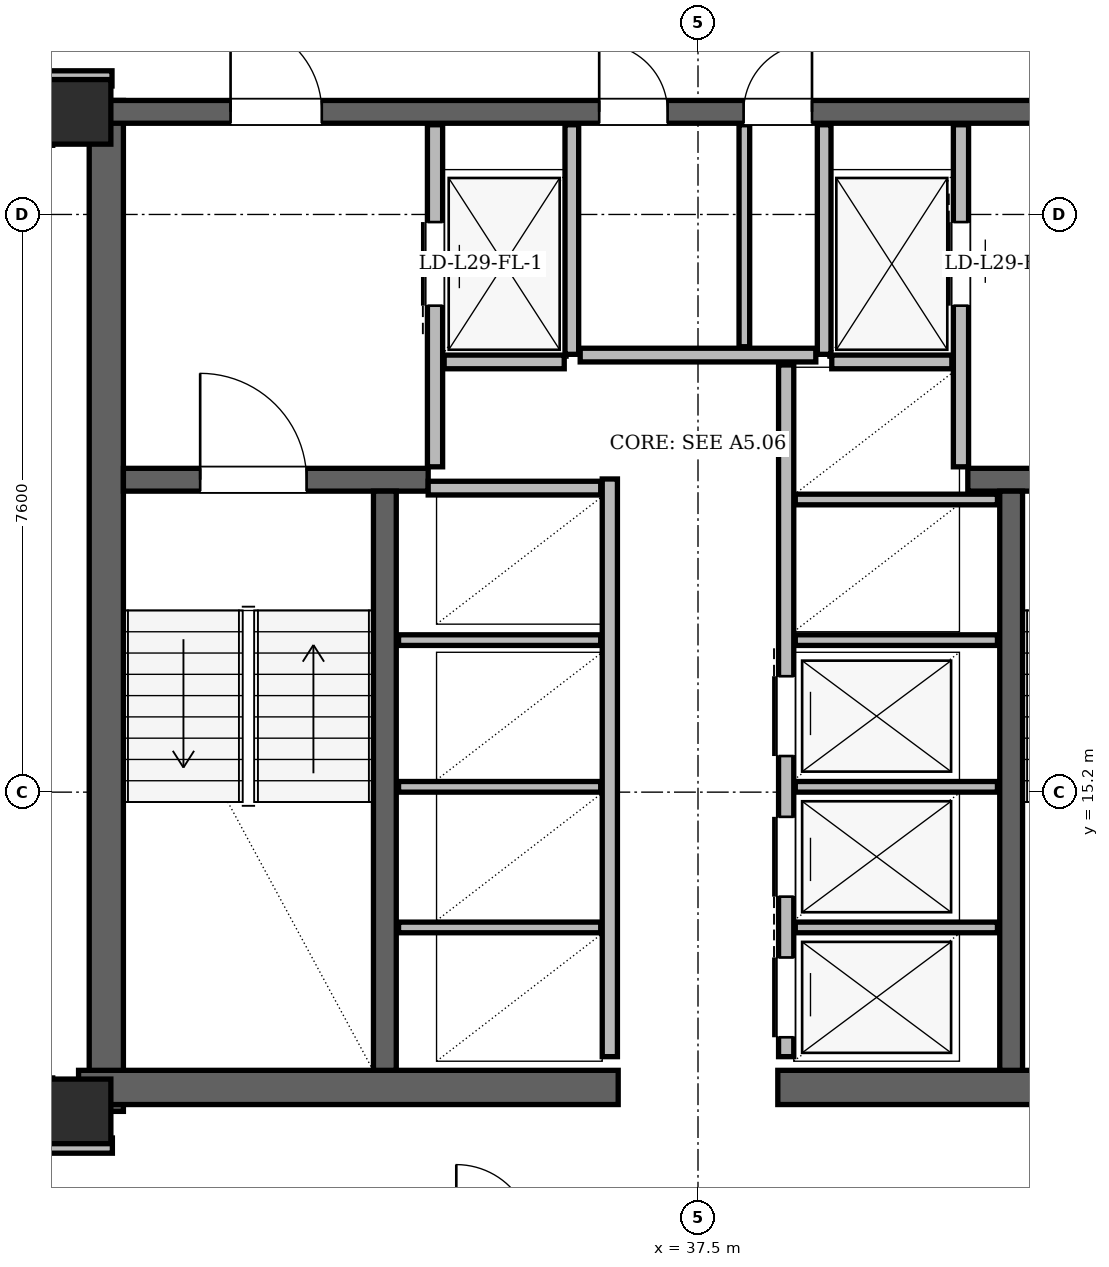
"""IFC4 building model, lengths in metres.
Left out: names, types, materials, properties, quantities, classifications, styles, units other than length and angle.
Written with IfcOpenShell. Run it as: python <this file> out.ifc"""

import sys

from ifc_helpers import new_model, si_unit, direction, frame, frame_2d, origin, origin_2d, place, context, subcontext, project, spatial, rectangle, hollow_rectangle, extrude, element, fill, save


model = new_model("IFC4")
c1 = context("Model", 3, precision=1e-05, world=origin(), true_north=direction((0.0, 1.0)))
c2 = subcontext(c1, "Body", "Model", "MODEL_VIEW")
j1 = project(units=[si_unit("LENGTHUNIT", "METRE"), si_unit("PLANEANGLEUNIT", "RADIAN")], contexts=[c1])
p1 = place(None, origin())
s1 = spatial("IfcSite", under=j1, at=p1, CompositionType="ELEMENT")
p2 = place(p1, origin())
s2 = spatial("IfcBuilding", under=s1, at=p2, CompositionType="ELEMENT")
p3 = place(p2, frame((0.0, 0.0, 112.2)))
s3 = spatial("IfcBuildingStorey", under=s2, at=p3, CompositionType="ELEMENT", Elevation=112.2)
for number, where, z_axis, x_axis in (
    (1, (29.35, 11.0, 0.0), (0.0, 0.0, 1.0), (1.0, 0.0, 0.0)),
    (2, (29.35, 24.15, 0.0), (0.0, 0.0, 1.0), (1.0, 0.0, 0.0)),
):
    element("IfcColumn", number, at=place(p3, frame(where, z_axis=z_axis, x_axis=x_axis)), inside=s3, PredefinedType="COLUMN", context=c2, shape_type="SweptSolid", body=[
        extrude(hollow_rectangle(XDim=0.85, YDim=0.85, WallThickness=0.07, at=origin_2d()), origin(), (0.0, 0.0, 1.0), 3.6),
    ])
p4 = place(p3, frame((29.715, 11.0, 0.0), z_axis=(0.0, 0.0, 1.0), x_axis=(0.0, 1.0, 0.0)))
e3 = element("IfcWall", 3, at=p4, inside=s3, PredefinedType="SHEAR", context=c2, shape_type="SweptSolid", body=[
    extrude(rectangle(XDim=13.3, YDim=0.45, at=frame_2d((6.65, 0.0))), origin(), (0.0, 0.0, 1.0), 3.36),
])
for number, where, z_axis, x_axis in (
    (4, (29.35, 11.315, 0.0), (0.0, 0.0, 1.0), (1.0, 0.0, 0.0)),
    (5, (38.55, 11.315, 0.0), (0.0, 0.0, 1.0), (1.0, 0.0, 0.0)),
):
    element("IfcWall", number, at=place(p3, frame(where, z_axis=z_axis, x_axis=x_axis)), inside=s3, PredefinedType="SHEAR", context=c2, shape_type="SweptSolid", body=[
        extrude(rectangle(XDim=7.1, YDim=0.45, at=frame_2d((3.55, 0.0))), origin(), (0.0, 0.0, 1.0), 3.36),
    ])
p5 = place(p3, frame((29.65, 24.15, 0.0), z_axis=(0.0, 0.0, 1.0), x_axis=(1.0, 0.0, 0.0)))
e6 = element("IfcWall", 6, at=p5, inside=s3, PredefinedType="SHEAR", context=c2, shape_type="SweptSolid", body=[
    extrude(rectangle(XDim=15.7, YDim=0.3, at=frame_2d((7.85, 0.0))), origin(), (0.0, 0.0, 1.0), 3.36),
])
p6 = place(p5, frame((1.7, 0.0, 0.0)))
e7 = element("IfcOpeningElement", 7, at=p6, cuts=e6, PredefinedType="OPENING", context=c2, shape_type="SweptSolid", body=[
    extrude(rectangle(XDim=1.2, YDim=2.2, at=frame_2d((0.6, 1.1))), frame((0.0, 0.15, 0.0), z_axis=(0.0, -1.0, 0.0), x_axis=(1.0, 0.0, 0.0)), (0.0, 0.0, 1.0), 0.3),
])
p7 = place(p5, frame((12.8, 0.0, 0.0)))
e8 = element("IfcOpeningElement", 8, at=p7, cuts=e6, PredefinedType="OPENING", context=c2, shape_type="SweptSolid", body=[
    extrude(rectangle(XDim=1.2, YDim=2.2, at=frame_2d((0.6, 1.1))), frame((0.0, 0.15, 0.0), z_axis=(0.0, -1.0, 0.0), x_axis=(1.0, 0.0, 0.0)), (0.0, 0.0, 1.0), 0.3),
])
p8 = place(p5, frame((6.55, 0.0, 0.0)))
e9 = element("IfcOpeningElement", 9, at=p8, cuts=e6, PredefinedType="OPENING", context=c2, shape_type="SweptSolid", body=[
    extrude(rectangle(XDim=0.9, YDim=2.05, at=frame_2d((0.45, 1.025))), frame((0.0, 0.15, 0.0), z_axis=(0.0, -1.0, 0.0), x_axis=(1.0, 0.0, 0.0)), (0.0, 0.0, 1.0), 0.3),
])
p9 = place(p5, frame((8.45, 0.0, 0.0)))
e10 = element("IfcOpeningElement", 10, at=p9, cuts=e6, PredefinedType="OPENING", context=c2, shape_type="SweptSolid", body=[
    extrude(rectangle(XDim=0.9, YDim=2.05, at=frame_2d((0.45, 1.025))), frame((0.0, 0.15, 0.0), z_axis=(0.0, -1.0, 0.0), x_axis=(1.0, 0.0, 0.0)), (0.0, 0.0, 1.0), 0.3),
])
p10 = place(p3, frame((29.94, 19.31, 0.0), z_axis=(0.0, 0.0, 1.0), x_axis=(1.0, 0.0, 0.0)))
e11 = element("IfcWall", 11, at=p10, inside=s3, PredefinedType="SHEAR", context=c2, shape_type="SweptSolid", body=[
    extrude(rectangle(XDim=4.01, YDim=0.3, at=frame_2d((2.005, 0.0))), origin(), (0.0, 0.0, 1.0), 3.36),
])
p11 = place(p10, frame((1.01, 0.0, 0.0)))
e12 = element("IfcOpeningElement", 12, at=p11, cuts=e11, PredefinedType="OPENING", context=c2, shape_type="SweptSolid", body=[
    extrude(rectangle(XDim=1.4, YDim=2.2, at=frame_2d((0.7, 1.1))), frame((0.0, 0.15, 0.0), z_axis=(0.0, -1.0, 0.0), x_axis=(1.0, 0.0, 0.0)), (0.0, 0.0, 1.0), 0.3),
])
p12 = place(p3, frame((41.05, 19.31, 0.0), z_axis=(0.0, 0.0, 1.0), x_axis=(1.0, 0.0, 0.0)))
e13 = element("IfcWall", 13, at=p12, inside=s3, PredefinedType="SHEAR", context=c2, shape_type="SweptSolid", body=[
    extrude(rectangle(XDim=4.01, YDim=0.3, at=frame_2d((2.005, 0.0))), origin(), (0.0, 0.0, 1.0), 3.36),
])
p13 = place(p12, frame((1.6, 0.0, 0.0)))
e14 = element("IfcOpeningElement", 14, at=p13, cuts=e13, PredefinedType="OPENING", context=c2, shape_type="SweptSolid", body=[
    extrude(rectangle(XDim=1.4, YDim=2.2, at=frame_2d((0.7, 1.1))), frame((0.0, 0.15, 0.0), z_axis=(0.0, -1.0, 0.0), x_axis=(1.0, 0.0, 0.0)), (0.0, 0.0, 1.0), 0.3),
])
for number, where, z_axis, x_axis in (
    (15, (33.38, 11.54, 0.0), (0.0, 0.0, 1.0), (0.0, 1.0, 0.0)),
    (16, (41.62, 11.54, 0.0), (0.0, 0.0, 1.0), (0.0, 1.0, 0.0)),
):
    element("IfcWall", number, at=place(p3, frame(where, z_axis=z_axis, x_axis=x_axis)), inside=s3, PredefinedType="SHEAR", context=c2, shape_type="SweptSolid", body=[
        extrude(rectangle(XDim=7.62, YDim=0.3, at=frame_2d((3.81, 0.0))), origin(), (0.0, 0.0, 1.0), 3.36),
    ])
p14 = place(p3, frame((31.85, 43.425, 0.0), z_axis=(0.0, 0.0, 1.0), x_axis=(-0.500004027594, -0.866023078439, 0.0)))
e17 = element("IfcWall", 17, at=p14, inside=s3, PredefinedType="SOLIDWALL", context=c2, shape_type="SweptSolid", body=[
    extrude(rectangle(XDim=34.75, YDim=0.34, at=frame_2d((17.375, 0.0))), origin(), (0.0, 0.0, 1.0), 2.578),
])
p15 = place(p14, frame((6.369, 0.0, 0.0)))
e18 = element("IfcOpeningElement", 18, at=p15, cuts=e17, PredefinedType="OPENING", context=c2, shape_type="SweptSolid", body=[
    extrude(rectangle(XDim=1.5, YDim=2.2, at=frame_2d((0.75, 1.1))), frame((0.0, 0.17, 0.0), z_axis=(0.0, -1.0, 0.0), x_axis=(1.0, 0.0, 0.0)), (0.0, 0.0, 1.0), 0.34),
])
p16 = place(p14, frame((25.216, 0.0, 0.0)))
e19 = element("IfcOpeningElement", 19, at=p16, cuts=e17, PredefinedType="OPENING", context=c2, shape_type="SweptSolid", body=[
    extrude(rectangle(XDim=1.5, YDim=2.2, at=frame_2d((0.75, 1.1))), frame((0.0, 0.17, 0.0), z_axis=(0.0, -1.0, 0.0), x_axis=(1.0, 0.0, 0.0)), (0.0, 0.0, 1.0), 0.34),
])
p17 = place(p14, frame((32.486, 0.0, 0.85)))
e20 = element("IfcOpeningElement", 20, at=p17, cuts=e17, PredefinedType="OPENING", context=c2, shape_type="SweptSolid", body=[
    extrude(rectangle(XDim=1.2, YDim=1.48, at=frame_2d((0.6, 0.74))), frame((0.0, 0.17, 0.0), z_axis=(0.0, -1.0, 0.0), x_axis=(1.0, 0.0, 0.0)), (0.0, 0.0, 1.0), 0.34),
])
p18 = place(p14, frame((27.16, 0.0, 0.85)))
e21 = element("IfcOpeningElement", 21, at=p18, cuts=e17, PredefinedType="OPENING", context=c2, shape_type="SweptSolid", body=[
    extrude(rectangle(XDim=1.2, YDim=1.48, at=frame_2d((0.6, 0.74))), frame((0.0, 0.17, 0.0), z_axis=(0.0, -1.0, 0.0), x_axis=(1.0, 0.0, 0.0)), (0.0, 0.0, 1.0), 0.34),
])
p19 = place(p14, frame((3.218, 0.0, 0.85)))
e22 = element("IfcOpeningElement", 22, at=p19, cuts=e17, PredefinedType="OPENING", context=c2, shape_type="SweptSolid", body=[
    extrude(rectangle(XDim=1.2, YDim=1.48, at=frame_2d((0.6, 0.74))), frame((0.0, 0.17, 0.0), z_axis=(0.0, -1.0, 0.0), x_axis=(1.0, 0.0, 0.0)), (0.0, 0.0, 1.0), 0.34),
])
p20 = place(p14, frame((14.421, 0.0, 0.85)))
e23 = element("IfcOpeningElement", 23, at=p20, cuts=e17, PredefinedType="OPENING", context=c2, shape_type="SweptSolid", body=[
    extrude(rectangle(XDim=1.2, YDim=1.48, at=frame_2d((0.6, 0.74))), frame((0.0, 0.17, 0.0), z_axis=(0.0, -1.0, 0.0), x_axis=(1.0, 0.0, 0.0)), (0.0, 0.0, 1.0), 0.34),
])
p21 = place(p3, frame((34.04, 19.48, 0.0), z_axis=(0.0, 0.0, 1.0), x_axis=(0.0, 1.0, 0.0)))
e24 = element("IfcWall", 24, at=p21, inside=s3, PredefinedType="PARTITIONING", context=c2, shape_type="SweptSolid", body=[
    extrude(rectangle(XDim=4.5, YDim=0.2, at=frame_2d((2.25, 0.0))), origin(), (0.0, 0.0, 1.0), 2.4),
])
p22 = place(p21, frame((2.12, 0.0, 0.0)))
e25 = element("IfcOpeningElement", 25, at=p22, cuts=e24, PredefinedType="OPENING", context=c2, shape_type="SweptSolid", body=[
    extrude(rectangle(XDim=1.1, YDim=2.2, at=frame_2d((0.55, 1.1))), frame((0.0, 0.1, 0.0), z_axis=(0.0, -1.0, 0.0), x_axis=(1.0, 0.0, 0.0)), (0.0, 0.0, 1.0), 0.2),
])
p23 = place(p3, frame((35.84, 20.96, 0.0), z_axis=(0.0, 0.0, 1.0), x_axis=(0.0, 1.0, 0.0)))
e26 = element("IfcWall", 26, at=p23, inside=s3, PredefinedType="PARTITIONING", context=c2, shape_type="SweptSolid", body=[
    extrude(rectangle(XDim=3.02, YDim=0.18, at=frame_2d((1.51, 0.0))), origin(), (0.0, 0.0, 1.0), 2.4),
])
p24 = place(p3, frame((34.16, 20.86, 0.0), z_axis=(0.0, 0.0, 1.0), x_axis=(1.0, 0.0, 0.0)))
e27 = element("IfcWall", 27, at=p24, inside=s3, PredefinedType="PARTITIONING", context=c2, shape_type="SweptSolid", body=[
    extrude(rectangle(XDim=1.58, YDim=0.18, at=frame_2d((0.79, 0.0))), origin(), (0.0, 0.0, 1.0), 3.36),
])
p25 = place(p3, frame((40.96, 19.48, 0.0), z_axis=(0.0, 0.0, 1.0), x_axis=(0.0, 1.0, 0.0)))
e28 = element("IfcWall", 28, at=p25, inside=s3, PredefinedType="PARTITIONING", context=c2, shape_type="SweptSolid", body=[
    extrude(rectangle(XDim=4.5, YDim=0.2, at=frame_2d((2.25, 0.0))), origin(), (0.0, 0.0, 1.0), 2.4),
])
p26 = place(p25, frame((2.12, 0.0, 0.0)))
e29 = element("IfcOpeningElement", 29, at=p26, cuts=e28, PredefinedType="OPENING", context=c2, shape_type="SweptSolid", body=[
    extrude(rectangle(XDim=1.1, YDim=2.2, at=frame_2d((0.55, 1.1))), frame((0.0, 0.1, 0.0), z_axis=(0.0, -1.0, 0.0), x_axis=(1.0, 0.0, 0.0)), (0.0, 0.0, 1.0), 0.2),
])
p27 = place(p3, frame((39.16, 20.96, 0.0), z_axis=(0.0, 0.0, 1.0), x_axis=(0.0, 1.0, 0.0)))
e30 = element("IfcWall", 30, at=p27, inside=s3, PredefinedType="PARTITIONING", context=c2, shape_type="SweptSolid", body=[
    extrude(rectangle(XDim=3.02, YDim=0.18, at=frame_2d((1.51, 0.0))), origin(), (0.0, 0.0, 1.0), 2.4),
])
p28 = place(p3, frame((39.26, 20.86, 0.0), z_axis=(0.0, 0.0, 1.0), x_axis=(1.0, 0.0, 0.0)))
e31 = element("IfcWall", 31, at=p28, inside=s3, PredefinedType="PARTITIONING", context=c2, shape_type="SweptSolid", body=[
    extrude(rectangle(XDim=1.58, YDim=0.18, at=frame_2d((0.79, 0.0))), origin(), (0.0, 0.0, 1.0), 3.36),
])
p29 = place(p3, frame((36.34, 11.72, 0.0), z_axis=(0.0, 0.0, 1.0), x_axis=(0.0, 1.0, 0.0)))
e32 = element("IfcWall", 32, at=p29, inside=s3, PredefinedType="PARTITIONING", context=c2, shape_type="SweptSolid", body=[
    extrude(rectangle(XDim=7.6, YDim=0.2, at=frame_2d((3.8, 0.0))), origin(), (0.0, 0.0, 1.0), 3.36),
])
p30 = place(p3, frame((33.95, 19.2, 0.0), z_axis=(0.0, 0.0, 1.0), x_axis=(1.0, 0.0, 0.0)))
e33 = element("IfcWall", 33, at=p30, inside=s3, PredefinedType="PARTITIONING", context=c2, shape_type="SweptSolid", body=[
    extrude(rectangle(XDim=2.27, YDim=0.18, at=frame_2d((1.135, 0.0))), origin(), (0.0, 0.0, 1.0), 3.36),
])
for number, where, z_axis, x_axis in (
    (34, (33.56, 13.42, 0.0), (0.0, 0.0, 1.0), (1.0, 0.0, 0.0)),
    (35, (33.56, 15.27, 0.0), (0.0, 0.0, 1.0), (1.0, 0.0, 0.0)),
    (36, (33.56, 17.2, 0.0), (0.0, 0.0, 1.0), (1.0, 0.0, 0.0)),
):
    element("IfcWall", number, at=place(p3, frame(where, z_axis=z_axis, x_axis=x_axis)), inside=s3, PredefinedType="PARTITIONING", context=c2, shape_type="SweptSolid", body=[
        extrude(rectangle(XDim=2.66, YDim=0.14, at=frame_2d((1.33, 0.0))), origin(), (0.0, 0.0, 1.0), 3.36),
    ])
p31 = place(p3, frame((38.66, 11.72, 0.0), z_axis=(0.0, 0.0, 1.0), x_axis=(0.0, 1.0, 0.0)))
e37 = element("IfcWall", 37, at=p31, inside=s3, PredefinedType="PARTITIONING", context=c2, shape_type="SweptSolid", body=[
    extrude(rectangle(XDim=9.1, YDim=0.2, at=frame_2d((4.55, 0.0))), origin(), (0.0, 0.0, 1.0), 3.36),
])
p32 = place(p31, frame((0.255, 0.0, 0.0)))
e38 = element("IfcOpeningElement", 38, at=p32, cuts=e37, PredefinedType="OPENING", context=c2, shape_type="SweptSolid", body=[
    extrude(rectangle(XDim=1.05, YDim=2.15, at=frame_2d((0.525, 1.075))), frame((0.0, 0.1, 0.0), z_axis=(0.0, -1.0, 0.0), x_axis=(1.0, 0.0, 0.0)), (0.0, 0.0, 1.0), 0.2),
])
p33 = place(p31, frame((2.105, 0.0, 0.0)))
e39 = element("IfcOpeningElement", 39, at=p33, cuts=e37, PredefinedType="OPENING", context=c2, shape_type="SweptSolid", body=[
    extrude(rectangle(XDim=1.05, YDim=2.15, at=frame_2d((0.525, 1.075))), frame((0.0, 0.1, 0.0), z_axis=(0.0, -1.0, 0.0), x_axis=(1.0, 0.0, 0.0)), (0.0, 0.0, 1.0), 0.2),
])
p34 = place(p31, frame((3.955, 0.0, 0.0)))
e40 = element("IfcOpeningElement", 40, at=p34, cuts=e37, PredefinedType="OPENING", context=c2, shape_type="SweptSolid", body=[
    extrude(rectangle(XDim=1.05, YDim=2.15, at=frame_2d((0.525, 1.075))), frame((0.0, 0.1, 0.0), z_axis=(0.0, -1.0, 0.0), x_axis=(1.0, 0.0, 0.0)), (0.0, 0.0, 1.0), 0.2),
])
for number, where, z_axis, x_axis in (
    (41, (38.78, 13.42, 0.0), (0.0, 0.0, 1.0), (1.0, 0.0, 0.0)),
    (42, (38.78, 15.27, 0.0), (0.0, 0.0, 1.0), (1.0, 0.0, 0.0)),
    (43, (38.78, 17.2, 0.0), (0.0, 0.0, 1.0), (1.0, 0.0, 0.0)),
    (44, (38.78, 19.05, 0.0), (0.0, 0.0, 1.0), (1.0, 0.0, 0.0)),
):
    element("IfcWall", number, at=place(p3, frame(where, z_axis=z_axis, x_axis=x_axis)), inside=s3, PredefinedType="PARTITIONING", context=c2, shape_type="SweptSolid", body=[
        extrude(rectangle(XDim=2.66, YDim=0.14, at=frame_2d((1.33, 0.0))), origin(), (0.0, 0.0, 1.0), 3.36),
    ])
p35 = place(p3, frame((35.95, 20.95, 0.0), z_axis=(0.0, 0.0, 1.0), x_axis=(1.0, 0.0, 0.0)))
e45 = element("IfcWall", 45, at=p35, inside=s3, PredefinedType="PARTITIONING", context=c2, shape_type="SweptSolid", body=[
    extrude(rectangle(XDim=3.1, YDim=0.18, at=frame_2d((1.55, 0.0))), origin(), (0.0, 0.0, 1.0), 3.36),
])
p36 = place(p3, frame((38.11, 21.06, 0.0), z_axis=(0.0, 0.0, 1.0), x_axis=(0.0, 1.0, 0.0)))
e46 = element("IfcWall", 46, at=p36, inside=s3, PredefinedType="PARTITIONING", context=c2, shape_type="SweptSolid", body=[
    extrude(rectangle(XDim=2.92, YDim=0.14, at=frame_2d((1.46, 0.0))), origin(), (0.0, 0.0, 1.0), 2.4),
])
p37 = place(p3, frame((28.905, 10.55, 0.0), z_axis=(0.0, 0.0, 1.0), x_axis=(1.0, 0.0, 0.0)))
e47 = element("IfcWall", 47, at=p37, inside=s3, PredefinedType="PARTITIONING", context=c2, shape_type="SweptSolid", body=[
    extrude(rectangle(XDim=0.89, YDim=0.2, at=frame_2d((0.445, 0.0))), origin(), (0.0, 0.0, 1.0), 3.36),
])
p38 = place(p3, frame((28.91, 24.59, 0.0), z_axis=(0.0, 0.0, 1.0), x_axis=(1.0, 0.0, 0.0)))
e48 = element("IfcWall", 48, at=p38, inside=s3, PredefinedType="PARTITIONING", context=c2, shape_type="SweptSolid", body=[
    extrude(rectangle(XDim=0.88, YDim=0.2, at=frame_2d((0.44, 0.0))), origin(), (0.0, 0.0, 1.0), 2.814),
])
p39 = place(p3, frame((28.91, 10.654, 0.0), z_axis=(0.0, 0.0, 1.0), x_axis=(0.0, 1.0, 0.0)))
e49 = element("IfcWall", 49, at=p39, inside=s3, PredefinedType="PARTITIONING", context=c2, shape_type="SweptSolid", body=[
    extrude(rectangle(XDim=0.786, YDim=0.2, at=frame_2d((0.393, 0.0))), origin(), (0.0, 0.0, 1.0), 2.814),
])
p40 = place(p3, frame((28.91, 23.71, 0.0), z_axis=(0.0, 0.0, 1.0), x_axis=(0.0, 1.0, 0.0)))
e50 = element("IfcWall", 50, at=p40, inside=s3, PredefinedType="PARTITIONING", context=c2, shape_type="SweptSolid", body=[
    extrude(rectangle(XDim=0.61, YDim=0.2, at=frame_2d((0.305, 0.0))), origin(), (0.0, 0.0, 1.0), 3.36),
])
p41 = place(p22, origin())
e51 = element("IfcDoor", 51, at=p41, inside=s3, OperationType="SLIDING_TO_LEFT", PredefinedType="DOOR", context=c2, shape_type="SweptSolid", body=[
    extrude(rectangle(XDim=1.1, YDim=2.2, at=frame_2d((0.55, 1.1))), frame((0.0, 0.025, 0.0), z_axis=(0.0, -1.0, 0.0), x_axis=(1.0, 0.0, 0.0)), (0.0, 0.0, 1.0), 0.05),
])
fill(e25, e51)
p42 = place(p26, origin())
e52 = element("IfcDoor", 52, at=p42, inside=s3, OperationType="SLIDING_TO_RIGHT", PredefinedType="DOOR", context=c2, shape_type="SweptSolid", body=[
    extrude(rectangle(XDim=1.1, YDim=2.2, at=frame_2d((0.55, 1.1))), frame((0.0, 0.025, 0.0), z_axis=(0.0, -1.0, 0.0), x_axis=(1.0, 0.0, 0.0)), (0.0, 0.0, 1.0), 0.05),
])
fill(e29, e52)
p43 = place(p32, origin())
e53 = element("IfcDoor", 53, at=p43, inside=s3, OperationType="SLIDING_TO_RIGHT", PredefinedType="DOOR", context=c2, shape_type="SweptSolid", body=[
    extrude(rectangle(XDim=1.05, YDim=2.15, at=frame_2d((0.525, 1.075))), frame((0.0, 0.025, 0.0), z_axis=(0.0, -1.0, 0.0), x_axis=(1.0, 0.0, 0.0)), (0.0, 0.0, 1.0), 0.05),
])
fill(e38, e53)
p44 = place(p33, origin())
e54 = element("IfcDoor", 54, at=p44, inside=s3, OperationType="SLIDING_TO_LEFT", PredefinedType="DOOR", context=c2, shape_type="SweptSolid", body=[
    extrude(rectangle(XDim=1.05, YDim=2.15, at=frame_2d((0.525, 1.075))), frame((0.0, 0.025, 0.0), z_axis=(0.0, -1.0, 0.0), x_axis=(1.0, 0.0, 0.0)), (0.0, 0.0, 1.0), 0.05),
])
fill(e39, e54)
p45 = place(p34, origin())
e55 = element("IfcDoor", 55, at=p45, inside=s3, OperationType="SLIDING_TO_RIGHT", PredefinedType="DOOR", context=c2, shape_type="SweptSolid", body=[
    extrude(rectangle(XDim=1.05, YDim=2.15, at=frame_2d((0.525, 1.075))), frame((0.0, 0.025, 0.0), z_axis=(0.0, -1.0, 0.0), x_axis=(1.0, 0.0, 0.0)), (0.0, 0.0, 1.0), 0.05),
])
fill(e40, e55)
p46 = place(p11, origin())
e56 = element("IfcDoor", 56, at=p46, inside=s3, OperationType="SINGLE_SWING_LEFT", PredefinedType="DOOR", context=c2, shape_type="SweptSolid", body=[
    extrude(rectangle(XDim=1.4, YDim=2.2, at=frame_2d((0.7, 1.1))), frame((0.0, 0.025, 0.0), z_axis=(0.0, -1.0, 0.0), x_axis=(1.0, 0.0, 0.0)), (0.0, 0.0, 1.0), 0.05),
])
fill(e12, e56)
p47 = place(p6, origin())
e57 = element("IfcDoor", 57, at=p47, inside=s3, OperationType="SINGLE_SWING_LEFT", PredefinedType="DOOR", context=c2, shape_type="SweptSolid", body=[
    extrude(rectangle(XDim=1.2, YDim=2.2, at=frame_2d((0.6, 1.1))), frame((0.0, 0.025, 0.0), z_axis=(0.0, -1.0, 0.0), x_axis=(1.0, 0.0, 0.0)), (0.0, 0.0, 1.0), 0.05),
])
fill(e7, e57)
p48 = place(p8, origin())
e58 = element("IfcDoor", 58, at=p48, inside=s3, OperationType="SINGLE_SWING_LEFT", PredefinedType="DOOR", context=c2, shape_type="SweptSolid", body=[
    extrude(rectangle(XDim=0.9, YDim=2.05, at=frame_2d((0.45, 1.025))), frame((0.0, 0.025, 0.0), z_axis=(0.0, -1.0, 0.0), x_axis=(1.0, 0.0, 0.0)), (0.0, 0.0, 1.0), 0.05),
])
fill(e9, e58)
p49 = place(p9, origin())
e59 = element("IfcDoor", 59, at=p49, inside=s3, OperationType="SINGLE_SWING_RIGHT", PredefinedType="DOOR", context=c2, shape_type="SweptSolid", body=[
    extrude(rectangle(XDim=0.9, YDim=2.05, at=frame_2d((0.45, 1.025))), frame((0.0, 0.025, 0.0), z_axis=(0.0, -1.0, 0.0), x_axis=(1.0, 0.0, 0.0)), (0.0, 0.0, 1.0), 0.05),
])
fill(e10, e59)
save(model, sys.argv[1])
